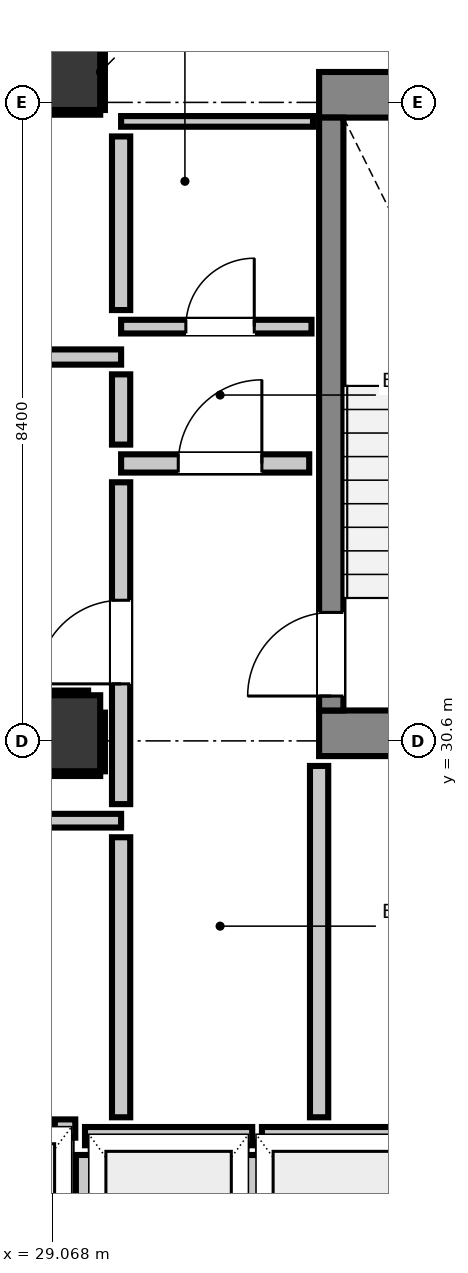
"""IFC4 building model, lengths in metres.
Left out: names, types, materials, properties, quantities, classifications, styles, units other than length and angle.
Written with IfcOpenShell. Run it as: python <this file> out.ifc"""

import sys

from ifc_helpers import new_model, si_unit, direction, frame, frame_2d, origin, origin_2d, place, context, subcontext, project, spatial, rectangle, extrude, element, fill, save


model = new_model("IFC4")
c1 = context("Model", 3, precision=1e-05, world=origin(), true_north=direction((0.0, 1.0)))
c2 = subcontext(c1, "Body", "Model", "MODEL_VIEW")
j1 = project(units=[si_unit("LENGTHUNIT", "METRE"), si_unit("PLANEANGLEUNIT", "RADIAN")], contexts=[c1])
p1 = place(None, origin())
s1 = spatial("IfcSite", under=j1, at=p1, CompositionType="ELEMENT")
p2 = place(p1, origin())
s2 = spatial("IfcBuilding", under=s1, at=p2, CompositionType="ELEMENT")
p3 = place(p2, frame((0.0, 0.0, 31.96)))
s3 = spatial("IfcBuildingStorey", under=s2, at=p3, CompositionType="ELEMENT", Elevation=31.96)
p4 = place(p3, frame((29.2, 39.4, 0.0), z_axis=(0.0, 0.0, 1.0), x_axis=(1.0, 0.0, 0.0)))
e1 = element("IfcColumn", 1, at=p4, inside=s3, PredefinedType="COLUMN", context=c2, shape_type="SweptSolid", body=[
    extrude(rectangle(XDim=1.0, YDim=1.0, at=origin_2d()), origin(), (0.0, 0.0, 1.0), 3.32),
])
p5 = place(p3, frame((32.58, 39.1, 0.0), z_axis=(0.0, 0.0, 1.0), x_axis=(1.0, 0.0, 0.0)))
e2 = element("IfcWall", 2, at=p5, inside=s3, PredefinedType="SHEAR", context=c2, shape_type="SweptSolid", body=[
    extrude(rectangle(XDim=4.08, YDim=0.6, at=frame_2d((2.04, 0.0))), origin(), (0.0, 0.0, 1.0), 3.32),
])
p6 = place(p3, frame((32.58, 30.7, 0.0), z_axis=(0.0, 0.0, 1.0), x_axis=(1.0, 0.0, 0.0)))
e3 = element("IfcWall", 3, at=p6, inside=s3, PredefinedType="SHEAR", context=c2, shape_type="SweptSolid", body=[
    extrude(rectangle(XDim=3.415, YDim=0.6, at=frame_2d((1.708, 0.0))), origin(), (0.0, 0.0, 1.0), 3.32),
])
p7 = place(p3, frame((32.74, 31.0, 0.0), z_axis=(0.0, 0.0, 1.0), x_axis=(0.0, 1.0, 0.0)))
e4 = element("IfcWall", 4, at=p7, inside=s3, PredefinedType="SHEAR", context=c2, shape_type="SweptSolid", body=[
    extrude(rectangle(XDim=7.8, YDim=0.32, at=frame_2d((3.9, 0.0))), origin(), (0.0, 0.0, 1.0), 3.32),
])
p8 = place(p7, frame((0.19, 0.0, 0.0)))
e5 = element("IfcOpeningElement", 5, at=p8, cuts=e4, PredefinedType="OPENING", context=c2, shape_type="SweptSolid", body=[
    extrude(rectangle(XDim=1.1, YDim=2.15, at=frame_2d((0.55, 1.075))), frame((0.0, 0.17, 0.0), z_axis=(0.0, -1.0, 0.0), x_axis=(1.0, 0.0, 0.0)), (0.0, 0.0, 1.0), 0.34),
])
p9 = place(p3, frame((29.2, 30.7, 0.0), z_axis=(0.0, 0.0, 1.0), x_axis=(1.0, 0.0, 0.0)))
e6 = element("IfcColumn", 6, at=p9, inside=s3, PredefinedType="COLUMN", context=c2, shape_type="SweptSolid", body=[
    extrude(rectangle(XDim=1.0, YDim=1.0, at=origin_2d()), origin(), (0.0, 0.0, 1.0), 3.32),
])
p10 = place(p3, frame((29.5, 25.4, 0.0), z_axis=(0.0, 0.0, 1.0), x_axis=(1.0, 0.0, 0.0)))
e7 = element("IfcWall", 7, at=p10, inside=s3, PredefinedType="PARTITIONING", context=c2, shape_type="SweptSolid", body=[
    extrude(rectangle(XDim=2.2, YDim=0.24, at=frame_2d((1.1, 0.0))), origin(), (0.0, 0.0, 1.0), 3.06),
])
p11 = place(p3, frame((29.5, 22.632, 0.0), z_axis=(0.0, 0.0, 1.0), x_axis=(0.0, 1.0, 0.0)))
e8 = element("IfcWall", 8, at=p11, inside=s3, PredefinedType="PARTITIONING", context=c2, shape_type="SweptSolid", body=[
    extrude(rectangle(XDim=2.52, YDim=0.24, at=frame_2d((1.26, 0.0))), origin(), (0.0, 0.0, 1.0), 2.295),
])
p12 = place(p3, frame((31.7, 22.73, 0.0), z_axis=(0.0, 0.0, 1.0), x_axis=(0.0, 1.0, 0.0)))
e9 = element("IfcWall", 9, at=p12, inside=s3, PredefinedType="PARTITIONING", context=c2, shape_type="SweptSolid", body=[
    extrude(rectangle(XDim=2.422, YDim=0.24, at=frame_2d((1.211, 0.0))), origin(), (0.0, 0.0, 1.0), 3.06),
])
p13 = place(p3, frame((31.828, 25.4, 0.0), z_axis=(0.0, 0.0, 1.0), x_axis=(1.0, 0.0, 0.0)))
e10 = element("IfcWall", 10, at=p13, inside=s3, PredefinedType="PARTITIONING", context=c2, shape_type="SweptSolid", body=[
    extrude(rectangle(XDim=2.072, YDim=0.24, at=frame_2d((1.036, 0.0))), origin(), (0.0, 0.0, 1.0), 3.06),
])
p14 = place(p3, frame((29.103, 25.5, 0.0), z_axis=(0.0, 0.0, 1.0), x_axis=(1.0, 0.0, 0.0)))
e11 = element("IfcWall", 11, at=p14, inside=s3, PredefinedType="PARTITIONING", context=c2, shape_type="SweptSolid", body=[
    extrude(rectangle(XDim=0.269, YDim=0.24, at=frame_2d((0.135, 0.0))), origin(), (0.0, 0.0, 1.0), 3.06),
])
p15 = place(p3, frame((29.975, 34.25, 0.0), z_axis=(0.0, 0.0, 1.0), x_axis=(1.0, 0.0, 0.0)))
e12 = element("IfcWall", 12, at=p15, inside=s3, PredefinedType="PARTITIONING", context=c2, shape_type="SweptSolid", body=[
    extrude(rectangle(XDim=2.475, YDim=0.24, at=frame_2d((1.237, 0.0))), origin(), (0.0, 0.0, 1.0), 3.06),
])
p16 = place(p15, frame((0.752, 0.0, 0.0)))
e13 = element("IfcOpeningElement", 13, at=p16, cuts=e12, PredefinedType="OPENING", context=c2, shape_type="SweptSolid", body=[
    extrude(rectangle(XDim=1.1, YDim=2.15, at=frame_2d((0.55, 1.075))), frame((0.0, 0.13, 0.0), z_axis=(0.0, -1.0, 0.0), x_axis=(1.0, 0.0, 0.0)), (0.0, 0.0, 1.0), 0.26),
])
p17 = place(p3, frame((28.604, 35.65, 0.0), z_axis=(0.0, 0.0, 1.0), x_axis=(1.0, 0.0, 0.0)))
e14 = element("IfcWall", 14, at=p17, inside=s3, PredefinedType="PARTITIONING", context=c2, shape_type="SweptSolid", body=[
    extrude(rectangle(XDim=1.371, YDim=0.2, at=frame_2d((0.686, 0.0))), origin(), (0.0, 0.0, 1.0), 3.06),
])
p18 = place(p3, frame((20.65, 29.55, 0.0), z_axis=(0.0, 0.0, 1.0), x_axis=(1.0, 0.0, 0.0)))
e15 = element("IfcWall", 15, at=p18, inside=s3, PredefinedType="PARTITIONING", context=c2, shape_type="SweptSolid", body=[
    extrude(rectangle(XDim=9.325, YDim=0.18, at=frame_2d((4.663, 0.0))), origin(), (0.0, 0.0, 1.0), 3.06),
])
p19 = place(p3, frame((29.975, 36.05, 0.0), z_axis=(0.0, 0.0, 1.0), x_axis=(1.0, 0.0, 0.0)))
e16 = element("IfcWall", 16, at=p19, inside=s3, PredefinedType="PARTITIONING", context=c2, shape_type="SweptSolid", body=[
    extrude(rectangle(XDim=2.505, YDim=0.18, at=frame_2d((1.252, 0.0))), origin(), (0.0, 0.0, 1.0), 3.06),
])
p20 = place(p19, frame((0.852, 0.0, 0.0)))
e17 = element("IfcOpeningElement", 17, at=p20, cuts=e16, PredefinedType="OPENING", context=c2, shape_type="SweptSolid", body=[
    extrude(rectangle(XDim=0.9, YDim=2.1, at=frame_2d((0.45, 1.05))), frame((0.0, 0.1, 0.0), z_axis=(0.0, -1.0, 0.0), x_axis=(1.0, 0.0, 0.0)), (0.0, 0.0, 1.0), 0.2),
])
p21 = place(p3, frame((29.975, 38.75, 0.0), z_axis=(0.0, 0.0, 1.0), x_axis=(1.0, 0.0, 0.0)))
e18 = element("IfcWall", 18, at=p21, inside=s3, PredefinedType="PARTITIONING", context=c2, shape_type="SweptSolid", body=[
    extrude(rectangle(XDim=2.525, YDim=0.14, at=frame_2d((1.262, 0.0))), origin(), (0.0, 0.0, 1.0), 3.06),
])
p22 = place(p3, frame((29.975, 25.648, 0.0), z_axis=(0.0, 0.0, 1.0), x_axis=(0.0, 1.0, 0.0)))
e19 = element("IfcWall", 19, at=p22, inside=s3, PredefinedType="PARTITIONING", context=c2, shape_type="SweptSolid", body=[
    extrude(rectangle(XDim=3.684, YDim=0.24, at=frame_2d((1.842, 0.0))), origin(), (0.0, 0.0, 1.0), 3.06),
])
p23 = place(p3, frame((29.975, 29.768, 0.0), z_axis=(0.0, 0.0, 1.0), x_axis=(0.0, 1.0, 0.0)))
e20 = element("IfcWall", 20, at=p23, inside=s3, PredefinedType="PARTITIONING", context=c2, shape_type="SweptSolid", body=[
    extrude(rectangle(XDim=4.234, YDim=0.24, at=frame_2d((2.117, 0.0))), origin(), (0.0, 0.0, 1.0), 3.06),
])
p24 = place(p23, frame((1.582, 0.0, 0.0)))
e21 = element("IfcOpeningElement", 21, at=p24, cuts=e20, PredefinedType="OPENING", context=c2, shape_type="SweptSolid", body=[
    extrude(rectangle(XDim=1.1, YDim=2.15, at=frame_2d((0.55, 1.075))), frame((0.0, 0.13, 0.0), z_axis=(0.0, -1.0, 0.0), x_axis=(1.0, 0.0, 0.0)), (0.0, 0.0, 1.0), 0.26),
])
p25 = place(p3, frame((29.975, 34.498, 0.0), z_axis=(0.0, 0.0, 1.0), x_axis=(0.0, 1.0, 0.0)))
e22 = element("IfcWall", 22, at=p25, inside=s3, PredefinedType="PARTITIONING", context=c2, shape_type="SweptSolid", body=[
    extrude(rectangle(XDim=0.924, YDim=0.24, at=frame_2d((0.462, 0.0))), origin(), (0.0, 0.0, 1.0), 3.06),
])
p26 = place(p3, frame((29.975, 36.268, 0.0), z_axis=(0.0, 0.0, 1.0), x_axis=(0.0, 1.0, 0.0)))
e23 = element("IfcWall", 23, at=p26, inside=s3, PredefinedType="PARTITIONING", context=c2, shape_type="SweptSolid", body=[
    extrude(rectangle(XDim=2.284, YDim=0.24, at=frame_2d((1.142, 0.0))), origin(), (0.0, 0.0, 1.0), 3.06),
])
p27 = place(p3, frame((32.58, 25.648, 0.0), z_axis=(0.0, 0.0, 1.0), x_axis=(0.0, 1.0, 0.0)))
e24 = element("IfcWall", 24, at=p27, inside=s3, PredefinedType="PARTITIONING", context=c2, shape_type="SweptSolid", body=[
    extrude(rectangle(XDim=4.622, YDim=0.24, at=frame_2d((2.311, 0.0))), origin(), (0.0, 0.0, 1.0), 3.06),
])
p28 = place(p3, frame((28.71, 38.868, 0.0), z_axis=(0.0, 0.0, 1.0), x_axis=(1.0, 0.0, 0.0)))
e25 = element("IfcWall", 25, at=p28, inside=s3, PredefinedType="PARTITIONING", context=c2, shape_type="SweptSolid", body=[
    extrude(rectangle(XDim=0.99, YDim=0.06, at=frame_2d((0.495, 0.0))), origin(), (0.0, 0.0, 1.0), 1.45),
])
for number, where, z_axis, x_axis in (
    (26, (29.732, 38.9, 0.0), (0.0, 0.0, 1.0), (0.0, 1.0, 0.0)),
    (27, (28.7, 30.168, 0.0), (0.0, 0.0, 1.0), (1.0, 0.0, 0.0)),
):
    element("IfcWall", number, at=place(p3, frame(where, z_axis=z_axis, x_axis=x_axis)), inside=s3, PredefinedType="PARTITIONING", context=c2, shape_type="SweptSolid", body=[
        extrude(rectangle(XDim=1.0, YDim=0.06, at=frame_2d((0.5, 0.0))), origin(), (0.0, 0.0, 1.0), 1.45),
    ])
p29 = place(p3, frame((28.7, 31.232, 0.0), z_axis=(0.0, 0.0, 1.0), x_axis=(1.0, 0.0, 0.0)))
e28 = element("IfcWall", 28, at=p29, inside=s3, PredefinedType="PARTITIONING", context=c2, shape_type="SweptSolid", body=[
    extrude(rectangle(XDim=0.841, YDim=0.06, at=frame_2d((0.42, 0.0))), origin(), (0.0, 0.0, 1.0), 1.45),
])
p30 = place(p3, frame((29.732, 30.2, 0.0), z_axis=(0.0, 0.0, 1.0), x_axis=(0.0, 1.0, 0.0)))
e29 = element("IfcWall", 29, at=p30, inside=s3, PredefinedType="PARTITIONING", context=c2, shape_type="SweptSolid", body=[
    extrude(rectangle(XDim=0.772, YDim=0.06, at=frame_2d((0.386, 0.0))), origin(), (0.0, 0.0, 1.0), 1.45),
])
p31 = place(p8, origin())
e30 = element("IfcDoor", 30, at=p31, inside=s3, OperationType="SINGLE_SWING_LEFT", PredefinedType="DOOR", context=c2, shape_type="SweptSolid", body=[
    extrude(rectangle(XDim=1.1, YDim=2.15, at=frame_2d((0.55, 1.075))), frame((0.0, 0.025, 0.0), z_axis=(0.0, -1.0, 0.0), x_axis=(1.0, 0.0, 0.0)), (0.0, 0.0, 1.0), 0.05),
])
fill(e5, e30)
p32 = place(p24, origin())
e31 = element("IfcDoor", 31, at=p32, inside=s3, OperationType="SINGLE_SWING_LEFT", PredefinedType="DOOR", context=c2, shape_type="SweptSolid", body=[
    extrude(rectangle(XDim=1.1, YDim=2.15, at=frame_2d((0.55, 1.075))), frame((0.0, 0.025, 0.0), z_axis=(0.0, -1.0, 0.0), x_axis=(1.0, 0.0, 0.0)), (0.0, 0.0, 1.0), 0.05),
])
fill(e21, e31)
p33 = place(p16, origin())
e32 = element("IfcDoor", 32, at=p33, inside=s3, OperationType="SINGLE_SWING_RIGHT", PredefinedType="DOOR", context=c2, shape_type="SweptSolid", body=[
    extrude(rectangle(XDim=1.1, YDim=2.15, at=frame_2d((0.55, 1.075))), frame((0.0, 0.025, 0.0), z_axis=(0.0, -1.0, 0.0), x_axis=(1.0, 0.0, 0.0)), (0.0, 0.0, 1.0), 0.05),
])
fill(e13, e32)
p34 = place(p20, origin())
e33 = element("IfcDoor", 33, at=p34, inside=s3, OperationType="SINGLE_SWING_RIGHT", PredefinedType="DOOR", context=c2, shape_type="SweptSolid", body=[
    extrude(rectangle(XDim=0.9, YDim=2.1, at=frame_2d((0.45, 1.05))), frame((0.0, 0.025, 0.0), z_axis=(0.0, -1.0, 0.0), x_axis=(1.0, 0.0, 0.0)), (0.0, 0.0, 1.0), 0.05),
])
fill(e17, e33)
save(model, sys.argv[1])
